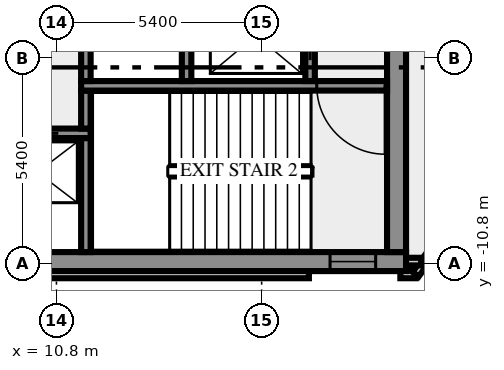
"""IFC4 building model, lengths in metres.
Left out: names, types, materials, properties, quantities, classifications, styles, units other than length and angle.
Written with IfcOpenShell. Run it as: python <this file> out.ifc"""

import sys

from ifc_helpers import new_model, si_unit, direction, frame, frame_2d, origin, place, context, subcontext, project, spatial, rectangle, extrude, element, fill, save


model = new_model("IFC4")
c1 = context("Model", 3, precision=1e-05, world=origin(), true_north=direction((0.0, 1.0)))
c2 = subcontext(c1, "Body", "Model", "MODEL_VIEW")
j1 = project(units=[si_unit("LENGTHUNIT", "METRE"), si_unit("PLANEANGLEUNIT", "RADIAN")], contexts=[c1])
p1 = place(None, origin())
s1 = spatial("IfcSite", under=j1, at=p1, CompositionType="ELEMENT")
p2 = place(p1, origin())
s2 = spatial("IfcBuilding", under=s1, at=p2, CompositionType="ELEMENT")
p3 = place(p2, frame((0.0, 0.0, 180.0)))
s3 = spatial("IfcBuildingStorey", under=s2, at=p3, CompositionType="ELEMENT", Elevation=180.0)
p4 = place(p3, frame((-17.444, -11.088, 0.0), z_axis=(0.0, 0.0, 1.0), x_axis=(1.0, 0.0, 0.0)))
e1 = element("IfcWall", 1, at=p4, inside=s3, PredefinedType="SOLIDWALL", context=c2, shape_type="SweptSolid", body=[
    extrude(rectangle(XDim=34.888, YDim=0.2, at=frame_2d((17.444, 0.0))), origin(), (0.0, 0.0, 1.0), 3.65),
])
p5 = place(p3, frame((19.85, -11.088, 0.0), z_axis=(0.0, 0.0, 1.0), x_axis=(1.0, 0.0, 0.0)))
e2 = element("IfcWall", 2, at=p5, inside=s3, PredefinedType="SOLIDWALL", context=c2, shape_type="SweptSolid", body=[
    extrude(rectangle(XDim=0.406, YDim=0.2, at=frame_2d((0.203, 0.0))), origin(), (0.0, 0.0, 1.0), 3.65),
])
p6 = place(p3, frame((20.253, -11.083, 0.0), z_axis=(0.0, 0.0, 1.0), x_axis=(0.587766567315, 0.809030569476, 0.0)))
e3 = element("IfcWall", 3, at=p6, inside=s3, PredefinedType="SOLIDWALL", context=c2, shape_type="SweptSolid", body=[
    extrude(rectangle(XDim=2.688, YDim=0.2, at=frame_2d((1.344, 0.0))), origin(), (0.0, 0.0, 1.0), 3.65),
])
p7 = place(p3, frame((19.98, -10.75, 0.0), z_axis=(0.0, 0.0, 1.0), x_axis=(1.0, 0.0, 0.0)))
e4 = element("IfcWall", 4, at=p7, inside=s3, PredefinedType="SOLIDWALL", context=c2, shape_type="SweptSolid", body=[
    extrude(rectangle(XDim=0.417, YDim=0.2, at=frame_2d((0.208, 0.0))), origin(), (0.0, 0.0, 1.0), 3.65),
])
p8 = place(p3, frame((-20.0, -10.75, 0.0), z_axis=(0.0, 0.0, 1.0), x_axis=(1.0, 0.0, 0.0)))
e5 = element("IfcWall", 5, at=p8, inside=s3, PredefinedType="SHEAR", context=c2, shape_type="SweptSolid", body=[
    extrude(rectangle(XDim=40.0, YDim=0.5, at=frame_2d((20.0, 0.0))), origin(), (0.0, 0.0, 1.0), 3.65),
])
p9 = place(p8, frame((0.8, 0.0, 1.0)))
e6 = element("IfcOpeningElement", 6, at=p9, cuts=e5, PredefinedType="OPENING", context=c2, shape_type="SweptSolid", body=[
    extrude(rectangle(XDim=1.2, YDim=1.2, at=frame_2d((0.6, 0.6))), frame((0.0, 0.26, 0.0), z_axis=(0.0, -1.0, 0.0), x_axis=(1.0, 0.0, 0.0)), (0.0, 0.0, 1.0), 0.52),
])
p10 = place(p8, frame((38.0, 0.0, 1.0)))
e7 = element("IfcOpeningElement", 7, at=p10, cuts=e5, PredefinedType="OPENING", context=c2, shape_type="SweptSolid", body=[
    extrude(rectangle(XDim=1.2, YDim=1.2, at=frame_2d((0.6, 0.6))), frame((0.0, 0.26, 0.0), z_axis=(0.0, -1.0, 0.0), x_axis=(1.0, 0.0, 0.0)), (0.0, 0.0, 1.0), 0.52),
])
p11 = place(p3, frame((11.575, -10.5, 0.0), z_axis=(0.0, 0.0, 1.0), x_axis=(0.0, 1.0, 0.0)))
e8 = element("IfcWall", 8, at=p11, inside=s3, PredefinedType="SHEAR", context=c2, shape_type="SweptSolid", body=[
    extrude(rectangle(XDim=3.0, YDim=0.25, at=frame_2d((1.5, 0.0))), origin(), (0.0, 0.0, 1.0), 3.65),
])
p12 = place(p3, frame((19.75, -10.5, 0.0), z_axis=(0.0, 0.0, 1.0), x_axis=(0.0, 1.0, 0.0)))
e9 = element("IfcWall", 9, at=p12, inside=s3, PredefinedType="SHEAR", context=c2, shape_type="SweptSolid", body=[
    extrude(rectangle(XDim=8.8, YDim=0.5, at=frame_2d((4.4, 0.0))), origin(), (0.0, 0.0, 1.0), 3.65),
])
p13 = place(p3, frame((11.7, -7.375, 0.0), z_axis=(0.0, 0.0, 1.0), x_axis=(-1.0, 0.0, 0.0)))
e10 = element("IfcWall", 10, at=p13, inside=s3, PredefinedType="SHEAR", context=c2, shape_type="SweptSolid", body=[
    extrude(rectangle(XDim=23.4, YDim=0.25, at=frame_2d((11.7, 0.0))), origin(), (0.0, 0.0, 1.0), 3.65),
])
p14 = place(p13, frame((20.613, 0.0, 0.0)))
e11 = element("IfcOpeningElement", 11, at=p14, cuts=e10, PredefinedType="OPENING", context=c2, shape_type="SweptSolid", body=[
    extrude(rectangle(XDim=0.9, YDim=2.1, at=frame_2d((0.45, 1.05))), frame((0.0, 0.135, 0.0), z_axis=(0.0, -1.0, 0.0), x_axis=(1.0, 0.0, 0.0)), (0.0, 0.0, 1.0), 0.27),
])
p15 = place(p13, frame((16.888, 0.0, 0.0)))
e12 = element("IfcOpeningElement", 12, at=p15, cuts=e10, PredefinedType="OPENING", context=c2, shape_type="SweptSolid", body=[
    extrude(rectangle(XDim=0.9, YDim=2.1, at=frame_2d((0.45, 1.05))), frame((0.0, 0.135, 0.0), z_axis=(0.0, -1.0, 0.0), x_axis=(1.0, 0.0, 0.0)), (0.0, 0.0, 1.0), 0.27),
])
p16 = place(p13, frame((14.25, 0.0, 0.0)))
e13 = element("IfcOpeningElement", 13, at=p16, cuts=e10, PredefinedType="OPENING", context=c2, shape_type="SweptSolid", body=[
    extrude(rectangle(XDim=0.9, YDim=2.1, at=frame_2d((0.45, 1.05))), frame((0.0, 0.135, 0.0), z_axis=(0.0, -1.0, 0.0), x_axis=(1.0, 0.0, 0.0)), (0.0, 0.0, 1.0), 0.27),
])
p17 = place(p13, frame((12.125, 0.0, 0.0)))
e14 = element("IfcOpeningElement", 14, at=p17, cuts=e10, PredefinedType="OPENING", context=c2, shape_type="SweptSolid", body=[
    extrude(rectangle(XDim=0.9, YDim=2.1, at=frame_2d((0.45, 1.05))), frame((0.0, 0.135, 0.0), z_axis=(0.0, -1.0, 0.0), x_axis=(1.0, 0.0, 0.0)), (0.0, 0.0, 1.0), 0.27),
])
p18 = place(p13, frame((10.45, 0.0, 0.0)))
e15 = element("IfcOpeningElement", 15, at=p18, cuts=e10, PredefinedType="OPENING", context=c2, shape_type="SweptSolid", body=[
    extrude(rectangle(XDim=0.75, YDim=2.1, at=frame_2d((0.375, 1.05))), frame((0.0, 0.135, 0.0), z_axis=(0.0, -1.0, 0.0), x_axis=(1.0, 0.0, 0.0)), (0.0, 0.0, 1.0), 0.27),
])
p19 = place(p13, frame((8.35, 0.0, 0.0)))
e16 = element("IfcOpeningElement", 16, at=p19, cuts=e10, PredefinedType="OPENING", context=c2, shape_type="SweptSolid", body=[
    extrude(rectangle(XDim=1.1, YDim=2.1, at=frame_2d((0.55, 1.05))), frame((0.0, 0.135, 0.0), z_axis=(0.0, -1.0, 0.0), x_axis=(1.0, 0.0, 0.0)), (0.0, 0.0, 1.0), 0.27),
])
p20 = place(p13, frame((5.85, 0.0, 0.0)))
e17 = element("IfcOpeningElement", 17, at=p20, cuts=e10, PredefinedType="OPENING", context=c2, shape_type="SweptSolid", body=[
    extrude(rectangle(XDim=1.1, YDim=2.1, at=frame_2d((0.55, 1.05))), frame((0.0, 0.135, 0.0), z_axis=(0.0, -1.0, 0.0), x_axis=(1.0, 0.0, 0.0)), (0.0, 0.0, 1.0), 0.27),
])
p21 = place(p13, frame((3.35, 0.0, 0.0)))
e18 = element("IfcOpeningElement", 18, at=p21, cuts=e10, PredefinedType="OPENING", context=c2, shape_type="SweptSolid", body=[
    extrude(rectangle(XDim=1.1, YDim=2.1, at=frame_2d((0.55, 1.05))), frame((0.0, 0.135, 0.0), z_axis=(0.0, -1.0, 0.0), x_axis=(1.0, 0.0, 0.0)), (0.0, 0.0, 1.0), 0.27),
])
p22 = place(p13, frame((0.85, 0.0, 0.0)))
e19 = element("IfcOpeningElement", 19, at=p22, cuts=e10, PredefinedType="OPENING", context=c2, shape_type="SweptSolid", body=[
    extrude(rectangle(XDim=1.1, YDim=2.1, at=frame_2d((0.55, 1.05))), frame((0.0, 0.135, 0.0), z_axis=(0.0, -1.0, 0.0), x_axis=(1.0, 0.0, 0.0)), (0.0, 0.0, 1.0), 0.27),
])
p23 = place(p3, frame((11.575, -7.25, 0.0), z_axis=(0.0, 0.0, 1.0), x_axis=(0.0, 1.0, 0.0)))
e20 = element("IfcWall", 20, at=p23, inside=s3, PredefinedType="SHEAR", context=c2, shape_type="SweptSolid", body=[
    extrude(rectangle(XDim=1.0, YDim=0.25, at=frame_2d((0.5, 0.0))), origin(), (0.0, 0.0, 1.0), 3.65),
])
p24 = place(p3, frame((19.5, -6.125, 0.0), z_axis=(0.0, 0.0, 1.0), x_axis=(-1.0, 0.0, 0.0)))
e21 = element("IfcWall", 21, at=p24, inside=s3, PredefinedType="SHEAR", context=c2, shape_type="SweptSolid", body=[
    extrude(rectangle(XDim=8.05, YDim=0.25, at=frame_2d((4.025, 0.0))), origin(), (0.0, 0.0, 1.0), 3.65),
])
p25 = place(p24, frame((0.05, 0.0, 0.0)))
e22 = element("IfcOpeningElement", 22, at=p25, cuts=e21, PredefinedType="OPENING", context=c2, shape_type="SweptSolid", body=[
    extrude(rectangle(XDim=1.8, YDim=2.1, at=frame_2d((0.9, 1.05))), frame((0.0, 0.135, 0.0), z_axis=(0.0, -1.0, 0.0), x_axis=(1.0, 0.0, 0.0)), (0.0, 0.0, 1.0), 0.27),
])
p26 = place(p3, frame((11.575, -6.0, 0.0), z_axis=(0.0, 0.0, 1.0), x_axis=(0.0, 1.0, 0.0)))
e23 = element("IfcWall", 23, at=p26, inside=s3, PredefinedType="SHEAR", context=c2, shape_type="SweptSolid", body=[
    extrude(rectangle(XDim=1.75, YDim=0.25, at=frame_2d((0.875, 0.0))), origin(), (0.0, 0.0, 1.0), 3.65),
])
p27 = place(p3, frame((14.225, -6.0, 0.0), z_axis=(0.0, 0.0, 1.0), x_axis=(0.0, 1.0, 0.0)))
e24 = element("IfcWall", 24, at=p27, inside=s3, PredefinedType="SHEAR", context=c2, shape_type="SweptSolid", body=[
    extrude(rectangle(XDim=4.3, YDim=0.25, at=frame_2d((2.15, 0.0))), origin(), (0.0, 0.0, 1.0), 3.65),
])
p28 = place(p3, frame((17.475, -6.0, 0.0), z_axis=(0.0, 0.0, 1.0), x_axis=(0.0, 1.0, 0.0)))
e25 = element("IfcWall", 25, at=p28, inside=s3, PredefinedType="SHEAR", context=c2, shape_type="SweptSolid", body=[
    extrude(rectangle(XDim=4.3, YDim=0.25, at=frame_2d((2.15, 0.0))), origin(), (0.0, 0.0, 1.0), 3.65),
])
p29 = place(p28, frame((0.55, 0.0, 0.0)))
e26 = element("IfcOpeningElement", 26, at=p29, cuts=e25, PredefinedType="OPENING", context=c2, shape_type="SweptSolid", body=[
    extrude(rectangle(XDim=1.3, YDim=2.1, at=frame_2d((0.65, 1.05))), frame((0.0, 0.135, 0.0), z_axis=(0.0, -1.0, 0.0), x_axis=(1.0, 0.0, 0.0)), (0.0, 0.0, 1.0), 0.27),
])
p30 = place(p10, origin())
e27 = element("IfcWindow", 27, at=p30, inside=s3, PartitioningType="SINGLE_PANEL", PredefinedType="WINDOW", context=c2, shape_type="SweptSolid", body=[
    extrude(rectangle(XDim=1.2, YDim=1.2, at=frame_2d((0.6, 0.6))), frame((0.0, 0.03, 0.0), z_axis=(0.0, -1.0, 0.0), x_axis=(1.0, 0.0, 0.0)), (0.0, 0.0, 1.0), 0.06),
])
fill(e7, e27)
p31 = place(p22, origin())
e28 = element("IfcDoor", 28, at=p31, inside=s3, OperationType="DOUBLE_DOOR_SLIDING", PredefinedType="DOOR", context=c2, shape_type="SweptSolid", body=[
    extrude(rectangle(XDim=1.1, YDim=2.1, at=frame_2d((0.55, 1.05))), frame((0.0, 0.025, 0.0), z_axis=(0.0, -1.0, 0.0), x_axis=(1.0, 0.0, 0.0)), (0.0, 0.0, 1.0), 0.05),
])
fill(e19, e28)
p32 = place(p25, origin())
e29 = element("IfcDoor", 29, at=p32, inside=s3, OperationType="DOUBLE_DOOR_SINGLE_SWING", PredefinedType="DOOR", context=c2, shape_type="SweptSolid", body=[
    extrude(rectangle(XDim=1.8, YDim=2.1, at=frame_2d((0.9, 1.05))), frame((0.0, 0.025, 0.0), z_axis=(0.0, -1.0, 0.0), x_axis=(1.0, 0.0, 0.0)), (0.0, 0.0, 1.0), 0.05),
])
fill(e22, e29)
p33 = place(p29, origin())
e30 = element("IfcDoor", 30, at=p33, inside=s3, OperationType="DOUBLE_DOOR_SLIDING", PredefinedType="DOOR", context=c2, shape_type="SweptSolid", body=[
    extrude(rectangle(XDim=1.3, YDim=2.1, at=frame_2d((0.65, 1.05))), frame((0.0, 0.025, 0.0), z_axis=(0.0, -1.0, 0.0), x_axis=(1.0, 0.0, 0.0)), (0.0, 0.0, 1.0), 0.05),
])
fill(e26, e30)
save(model, sys.argv[1])
